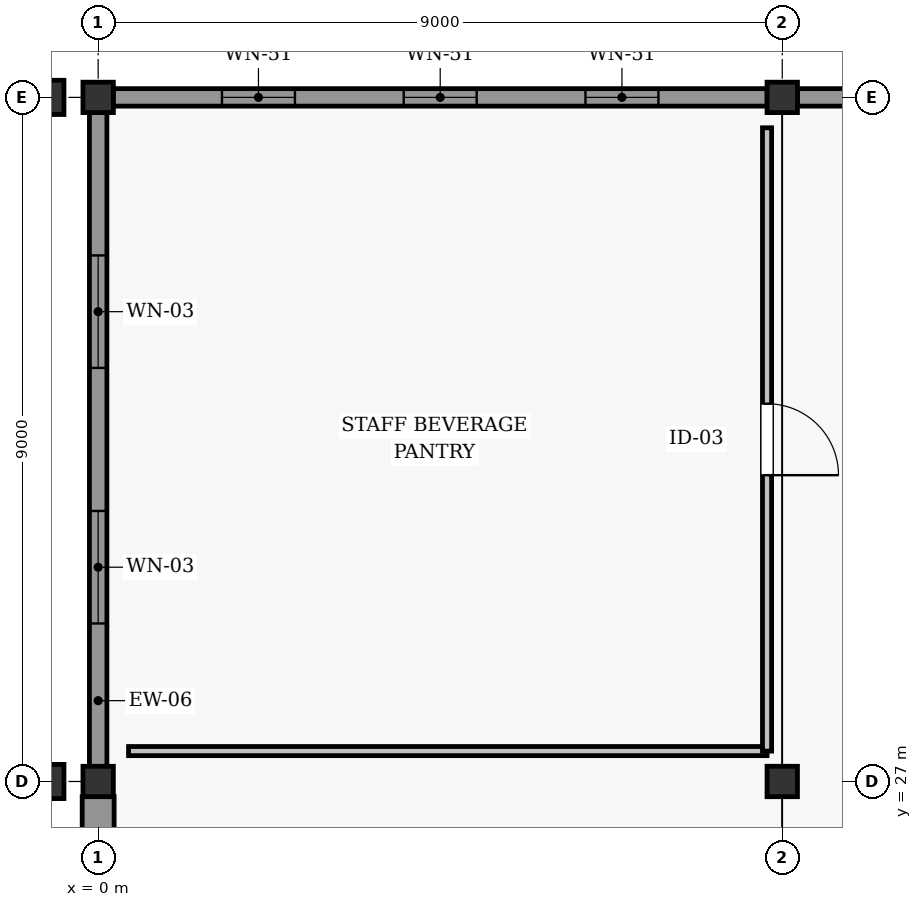
"""IFC4 building model, lengths in metres.
Left out: names, types, materials, properties, quantities, classifications, styles, units other than length and angle.
Written with IfcOpenShell. Run it as: python <this file> out.ifc"""

import sys

from ifc_helpers import new_model, si_unit, direction, frame, frame_2d, origin, origin_2d, place, context, subcontext, project, spatial, rectangle, extrude, element, fill, save


model = new_model("IFC4")
c1 = context("Model", 3, precision=1e-05, world=origin(), true_north=direction((0.0, 1.0)))
c2 = subcontext(c1, "Body", "Model", "MODEL_VIEW")
j1 = project(units=[si_unit("LENGTHUNIT", "METRE"), si_unit("PLANEANGLEUNIT", "RADIAN")], contexts=[c1])
p1 = place(None, origin())
s1 = spatial("IfcSite", under=j1, at=p1, CompositionType="ELEMENT")
p2 = place(p1, origin())
s2 = spatial("IfcBuilding", under=s1, at=p2, CompositionType="ELEMENT")
p3 = place(p2, frame((0.0, 0.0, 15.0)))
s3 = spatial("IfcBuildingStorey", under=s2, at=p3, CompositionType="ELEMENT", Elevation=15.0)
for number, where, z_axis, x_axis in (
    (1, (0.0, 27.0, 0.0), (0.0, 0.0, 1.0), (1.0, 0.0, 0.0)),
    (2, (0.0, 36.0, 0.0), (0.0, 0.0, 1.0), (1.0, 0.0, 0.0)),
    (3, (9.0, 27.0, 0.0), (0.0, 0.0, 1.0), (1.0, 0.0, 0.0)),
    (4, (9.0, 36.0, 0.0), (0.0, 0.0, 1.0), (1.0, 0.0, 0.0)),
):
    element("IfcColumn", number, at=place(p3, frame(where, z_axis=z_axis, x_axis=x_axis)), inside=s3, PredefinedType="COLUMN", context=c2, shape_type="SweptSolid", body=[
        extrude(rectangle(XDim=0.4, YDim=0.4, at=origin_2d()), origin(), (0.0, 0.0, 1.0), 3.0),
    ])
p4 = place(p3, frame((-0.75, 27.0, 0.0), z_axis=(0.0, 0.0, 1.0), x_axis=(0.0, 1.0, 0.0)))
e5 = element("IfcColumn", 5, at=p4, inside=s3, PredefinedType="PILASTER", context=c2, shape_type="SweptSolid", body=[
    extrude(rectangle(XDim=0.45, YDim=0.6, at=origin_2d()), origin(), (0.0, 0.0, 1.0), 3.95),
])
p5 = place(p3, frame((-0.75, 36.0, 0.0), z_axis=(0.0, 0.0, 1.0), x_axis=(0.0, 1.0, 0.0)))
e6 = element("IfcColumn", 6, at=p5, inside=s3, PredefinedType="PILASTER", context=c2, shape_type="SweptSolid", body=[
    extrude(rectangle(XDim=0.45, YDim=0.6, at=origin_2d()), origin(), (0.0, 0.0, 1.0), 3.0),
])
p6 = place(p3, frame((0.198, 36.0, 0.0), z_axis=(0.0, 0.0, 1.0), x_axis=(1.0, 0.0, 0.0)))
e7 = element("IfcWall", 7, at=p6, inside=s3, PredefinedType="SOLIDWALL", context=c2, shape_type="SweptSolid", body=[
    extrude(rectangle(XDim=8.604, YDim=0.23, at=frame_2d((4.302, 0.0))), origin(), (0.0, 0.0, 1.0), 2.292),
])
p7 = place(p6, frame((1.431, 0.0, 0.8)))
e8 = element("IfcOpeningElement", 8, at=p7, cuts=e7, PredefinedType="OPENING", context=c2, shape_type="SweptSolid", body=[
    extrude(rectangle(XDim=0.96, YDim=1.04, at=frame_2d((0.48, 0.52))), frame((0.0, 0.125, 0.0), z_axis=(0.0, -1.0, 0.0), x_axis=(1.0, 0.0, 0.0)), (0.0, 0.0, 1.0), 0.25),
])
p8 = place(p6, frame((3.822, 0.0, 0.8)))
e9 = element("IfcOpeningElement", 9, at=p8, cuts=e7, PredefinedType="OPENING", context=c2, shape_type="SweptSolid", body=[
    extrude(rectangle(XDim=0.96, YDim=1.04, at=frame_2d((0.48, 0.52))), frame((0.0, 0.125, 0.0), z_axis=(0.0, -1.0, 0.0), x_axis=(1.0, 0.0, 0.0)), (0.0, 0.0, 1.0), 0.25),
])
p9 = place(p6, frame((6.213, 0.0, 0.8)))
e10 = element("IfcOpeningElement", 10, at=p9, cuts=e7, PredefinedType="OPENING", context=c2, shape_type="SweptSolid", body=[
    extrude(rectangle(XDim=0.96, YDim=1.04, at=frame_2d((0.48, 0.52))), frame((0.0, 0.125, 0.0), z_axis=(0.0, -1.0, 0.0), x_axis=(1.0, 0.0, 0.0)), (0.0, 0.0, 1.0), 0.25),
])
p10 = place(p3, frame((9.198, 36.0, 0.0), z_axis=(0.0, 0.0, 1.0), x_axis=(1.0, 0.0, 0.0)))
e11 = element("IfcWall", 11, at=p10, inside=s3, PredefinedType="SOLIDWALL", context=c2, shape_type="SweptSolid", body=[
    extrude(rectangle(XDim=8.604, YDim=0.23, at=frame_2d((4.302, 0.0))), origin(), (0.0, 0.0, 1.0), 2.292),
])
p11 = place(p10, frame((1.431, 0.0, 0.8)))
e12 = element("IfcOpeningElement", 12, at=p11, cuts=e11, PredefinedType="OPENING", context=c2, shape_type="SweptSolid", body=[
    extrude(rectangle(XDim=0.96, YDim=1.04, at=frame_2d((0.48, 0.52))), frame((0.0, 0.125, 0.0), z_axis=(0.0, -1.0, 0.0), x_axis=(1.0, 0.0, 0.0)), (0.0, 0.0, 1.0), 0.25),
])
p12 = place(p10, frame((3.822, 0.0, 0.8)))
e13 = element("IfcOpeningElement", 13, at=p12, cuts=e11, PredefinedType="OPENING", context=c2, shape_type="SweptSolid", body=[
    extrude(rectangle(XDim=0.96, YDim=1.04, at=frame_2d((0.48, 0.52))), frame((0.0, 0.125, 0.0), z_axis=(0.0, -1.0, 0.0), x_axis=(1.0, 0.0, 0.0)), (0.0, 0.0, 1.0), 0.25),
])
p13 = place(p10, frame((6.213, 0.0, 0.8)))
e14 = element("IfcOpeningElement", 14, at=p13, cuts=e11, PredefinedType="OPENING", context=c2, shape_type="SweptSolid", body=[
    extrude(rectangle(XDim=0.96, YDim=1.04, at=frame_2d((0.48, 0.52))), frame((0.0, 0.125, 0.0), z_axis=(0.0, -1.0, 0.0), x_axis=(1.0, 0.0, 0.0)), (0.0, 0.0, 1.0), 0.25),
])
p14 = place(p3, frame((0.0, 18.198, 0.0), z_axis=(0.0, 0.0, 1.0), x_axis=(0.0, 1.0, 0.0)))
e15 = element("IfcWall", 15, at=p14, inside=s3, PredefinedType="SOLIDWALL", context=c2, shape_type="SweptSolid", body=[
    extrude(rectangle(XDim=8.604, YDim=0.42, at=frame_2d((4.302, 0.0))), origin(), (0.0, 0.0, 1.0), 2.242),
])
p15 = place(p3, frame((0.0, 27.198, 0.0), z_axis=(0.0, 0.0, 1.0), x_axis=(0.0, 1.0, 0.0)))
e16 = element("IfcWall", 16, at=p15, inside=s3, PredefinedType="SOLIDWALL", context=c2, shape_type="SweptSolid", body=[
    extrude(rectangle(XDim=8.604, YDim=0.23, at=frame_2d((4.302, 0.0))), origin(), (0.0, 0.0, 1.0), 2.292),
])
p16 = place(p15, frame((1.881, 0.0, 0.55)))
e17 = element("IfcOpeningElement", 17, at=p16, cuts=e16, PredefinedType="OPENING", context=c2, shape_type="SweptSolid", body=[
    extrude(rectangle(XDim=1.48, YDim=1.56, at=frame_2d((0.74, 0.78))), frame((0.0, 0.125, 0.0), z_axis=(0.0, -1.0, 0.0), x_axis=(1.0, 0.0, 0.0)), (0.0, 0.0, 1.0), 0.25),
])
p17 = place(p15, frame((5.243, 0.0, 0.55)))
e18 = element("IfcOpeningElement", 18, at=p17, cuts=e16, PredefinedType="OPENING", context=c2, shape_type="SweptSolid", body=[
    extrude(rectangle(XDim=1.48, YDim=1.56, at=frame_2d((0.74, 0.78))), frame((0.0, 0.125, 0.0), z_axis=(0.0, -1.0, 0.0), x_axis=(1.0, 0.0, 0.0)), (0.0, 0.0, 1.0), 0.25),
])
p18 = place(p3, frame((0.4, 27.4, 0.0), z_axis=(0.0, 0.0, 1.0), x_axis=(1.0, 0.0, 0.0)))
e19 = element("IfcWall", 19, at=p18, inside=s3, PredefinedType="PARTITIONING", context=c2, shape_type="SweptSolid", body=[
    extrude(rectangle(XDim=8.4, YDim=0.12, at=frame_2d((4.2, 0.0))), origin(), (0.0, 0.0, 1.0), 2.295),
])
p19 = place(p3, frame((8.8, 27.4, 0.0), z_axis=(0.0, 0.0, 1.0), x_axis=(0.0, 1.0, 0.0)))
e20 = element("IfcWall", 20, at=p19, inside=s3, PredefinedType="PARTITIONING", context=c2, shape_type="SweptSolid", body=[
    extrude(rectangle(XDim=8.2, YDim=0.12, at=frame_2d((4.1, 0.0))), origin(), (0.0, 0.0, 1.0), 2.295),
])
p20 = place(p19, frame((3.63, 0.0, 0.0)))
e21 = element("IfcOpeningElement", 21, at=p20, cuts=e20, PredefinedType="OPENING", context=c2, shape_type="SweptSolid", body=[
    extrude(rectangle(XDim=0.94, YDim=2.06, at=frame_2d((0.47, 1.03))), frame((0.0, 0.07, 0.0), z_axis=(0.0, -1.0, 0.0), x_axis=(1.0, 0.0, 0.0)), (0.0, 0.0, 1.0), 0.14),
])
p21 = place(p7, origin())
e22 = element("IfcWindow", 22, at=p21, inside=s3, PartitioningType="SINGLE_PANEL", PredefinedType="WINDOW", context=c2, shape_type="SweptSolid", body=[
    extrude(rectangle(XDim=0.96, YDim=1.04, at=frame_2d((0.48, 0.52))), frame((0.0, 0.03, 0.0), z_axis=(0.0, -1.0, 0.0), x_axis=(1.0, 0.0, 0.0)), (0.0, 0.0, 1.0), 0.06),
])
fill(e8, e22)
p22 = place(p8, origin())
e23 = element("IfcWindow", 23, at=p22, inside=s3, PartitioningType="SINGLE_PANEL", PredefinedType="WINDOW", context=c2, shape_type="SweptSolid", body=[
    extrude(rectangle(XDim=0.96, YDim=1.04, at=frame_2d((0.48, 0.52))), frame((0.0, 0.03, 0.0), z_axis=(0.0, -1.0, 0.0), x_axis=(1.0, 0.0, 0.0)), (0.0, 0.0, 1.0), 0.06),
])
fill(e9, e23)
p23 = place(p9, origin())
e24 = element("IfcWindow", 24, at=p23, inside=s3, PartitioningType="SINGLE_PANEL", PredefinedType="WINDOW", context=c2, shape_type="SweptSolid", body=[
    extrude(rectangle(XDim=0.96, YDim=1.04, at=frame_2d((0.48, 0.52))), frame((0.0, 0.03, 0.0), z_axis=(0.0, -1.0, 0.0), x_axis=(1.0, 0.0, 0.0)), (0.0, 0.0, 1.0), 0.06),
])
fill(e10, e24)
p24 = place(p16, origin())
e25 = element("IfcWindow", 25, at=p24, inside=s3, PartitioningType="SINGLE_PANEL", PredefinedType="WINDOW", context=c2, shape_type="SweptSolid", body=[
    extrude(rectangle(XDim=1.48, YDim=1.56, at=frame_2d((0.74, 0.78))), frame((0.0, 0.03, 0.0), z_axis=(0.0, -1.0, 0.0), x_axis=(1.0, 0.0, 0.0)), (0.0, 0.0, 1.0), 0.06),
])
fill(e17, e25)
p25 = place(p17, origin())
e26 = element("IfcWindow", 26, at=p25, inside=s3, PartitioningType="SINGLE_PANEL", PredefinedType="WINDOW", context=c2, shape_type="SweptSolid", body=[
    extrude(rectangle(XDim=1.48, YDim=1.56, at=frame_2d((0.74, 0.78))), frame((0.0, 0.03, 0.0), z_axis=(0.0, -1.0, 0.0), x_axis=(1.0, 0.0, 0.0)), (0.0, 0.0, 1.0), 0.06),
])
fill(e18, e26)
p26 = place(p20, frame((0.94, 0.0, 0.0), z_axis=(0.0, 0.0, 1.0), x_axis=(-1.0, 0.0, 0.0)))
e27 = element("IfcDoor", 27, at=p26, inside=s3, OperationType="SINGLE_SWING_LEFT", PredefinedType="DOOR", context=c2, shape_type="SweptSolid", body=[
    extrude(rectangle(XDim=0.94, YDim=2.06, at=frame_2d((0.47, 1.03))), frame((0.0, 0.025, 0.0), z_axis=(0.0, -1.0, 0.0), x_axis=(1.0, 0.0, 0.0)), (0.0, 0.0, 1.0), 0.05),
])
fill(e21, e27)
save(model, sys.argv[1])
